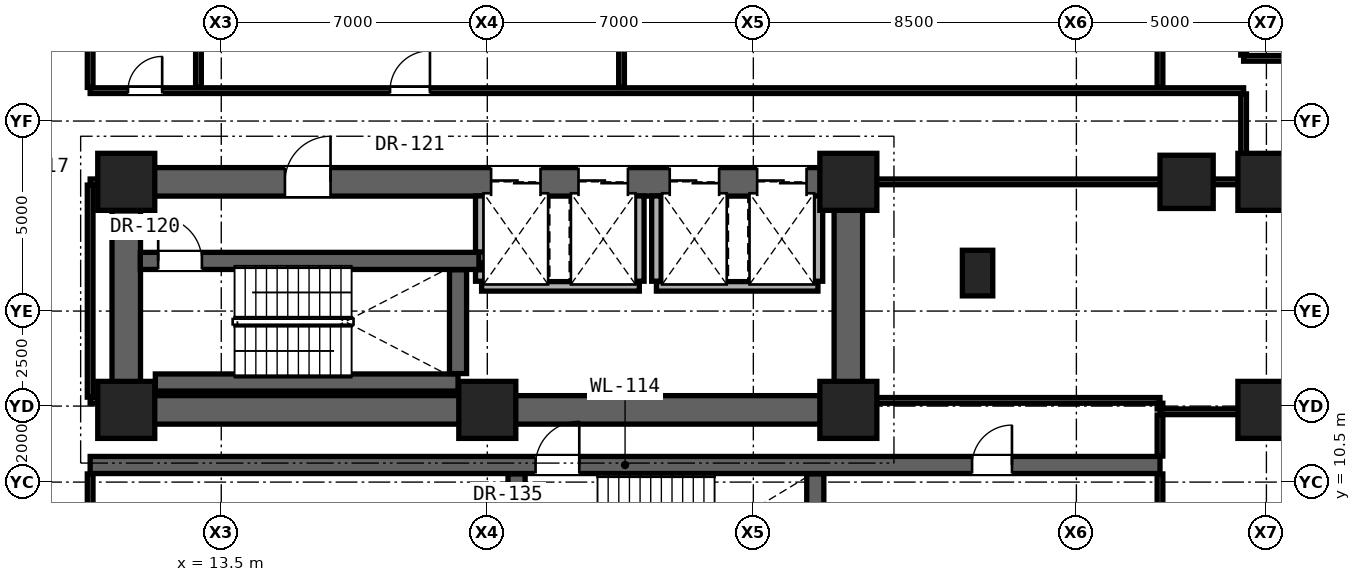
"""IFC4 building model, lengths in metres.
Left out: names, types, materials, properties, quantities, classifications, styles, units other than length and angle.
Written with IfcOpenShell. Run it as: python <this file> out.ifc"""

import sys

from ifc_helpers import new_model, si_unit, direction, frame, frame_2d, origin, origin_2d, place, context, subcontext, project, spatial, rectangle, hollow_rectangle, extrude, element, fill, save


model = new_model("IFC4")
c1 = context("Model", 3, precision=1e-05, world=origin(), true_north=direction((0.0, 1.0)))
c2 = subcontext(c1, "Body", "Model", "MODEL_VIEW")
j1 = project(units=[si_unit("LENGTHUNIT", "METRE"), si_unit("PLANEANGLEUNIT", "RADIAN")], contexts=[c1])
p1 = place(None, origin())
s1 = spatial("IfcSite", under=j1, at=p1, CompositionType="ELEMENT")
p2 = place(p1, origin())
s2 = spatial("IfcBuilding", under=s1, at=p2, CompositionType="ELEMENT")
p3 = place(p2, frame((0.0, 0.0, 13.8)))
s3 = spatial("IfcBuildingStorey", under=s2, at=p3, CompositionType="ELEMENT", Elevation=13.8)
for number, where, z_axis, x_axis in (
    (1, (11.0, 12.4, 0.0), (0.0, 0.0, 1.0), (1.0, 0.0, 0.0)),
    (2, (20.5, 12.4, 0.0), (0.0, 0.0, 1.0), (1.0, 0.0, 0.0)),
    (3, (30.0, 12.4, 0.0), (0.0, 0.0, 1.0), (1.0, 0.0, 0.0)),
    (4, (11.0, 18.4, 0.0), (0.0, 0.0, 1.0), (1.0, 0.0, 0.0)),
    (5, (30.0, 18.4, 0.0), (0.0, 0.0, 1.0), (1.0, 0.0, 0.0)),
):
    element("IfcColumn", number, at=place(p3, frame(where, z_axis=z_axis, x_axis=x_axis)), inside=s3, PredefinedType="COLUMN", context=c2, shape_type="SweptSolid", body=[
        extrude(rectangle(XDim=1.5, YDim=1.5, at=origin_2d()), origin(), (0.0, 0.0, 1.0), 4.3),
    ])
p4 = place(p3, frame((38.9, 18.4, 0.0), z_axis=(0.0, 0.0, 1.0), x_axis=(1.0, 0.0, 0.0)))
e6 = element("IfcColumn", 6, at=p4, inside=s3, PredefinedType="COLUMN", context=c2, shape_type="SweptSolid", body=[
    extrude(hollow_rectangle(XDim=1.4, YDim=1.4, WallThickness=0.08, at=origin_2d()), origin(), (0.0, 0.0, 1.0), 4.3),
])
p5 = place(p3, frame((33.4, 16.0, 0.0), z_axis=(0.0, 0.0, 1.0), x_axis=(1.0, 0.0, 0.0)))
e7 = element("IfcColumn", 7, at=p5, inside=s3, PredefinedType="PILASTER", context=c2, shape_type="SweptSolid", body=[
    extrude(rectangle(XDim=0.8, YDim=1.2, at=origin_2d()), origin(), (0.0, 0.0, 1.0), 4.3),
])
p6 = place(p3, frame((11.0, 12.4, 0.0), z_axis=(0.0, 0.0, 1.0), x_axis=(1.0, 0.0, 0.0)))
e8 = element("IfcWall", 8, at=p6, inside=s3, PredefinedType="SHEAR", context=c2, shape_type="SweptSolid", body=[
    extrude(rectangle(XDim=19.0, YDim=0.75, at=frame_2d((9.5, 0.0))), origin(), (0.0, 0.0, 1.0), 3.65),
])
for number, where, z_axis, x_axis in (
    (9, (11.0, 12.4, 0.0), (0.0, 0.0, 1.0), (0.0, 1.0, 0.0)),
    (10, (30.0, 12.4, 0.0), (0.0, 0.0, 1.0), (0.0, 1.0, 0.0)),
):
    element("IfcWall", number, at=place(p3, frame(where, z_axis=z_axis, x_axis=x_axis)), inside=s3, PredefinedType="SHEAR", context=c2, shape_type="SweptSolid", body=[
        extrude(rectangle(XDim=6.0, YDim=0.75, at=frame_2d((3.0, 0.0))), origin(), (0.0, 0.0, 1.0), 3.65),
    ])
p7 = place(p3, frame((11.0, 18.4, 0.0), z_axis=(0.0, 0.0, 1.0), x_axis=(1.0, 0.0, 0.0)))
e11 = element("IfcWall", 11, at=p7, inside=s3, PredefinedType="SHEAR", context=c2, shape_type="SweptSolid", body=[
    extrude(rectangle(XDim=19.0, YDim=0.75, at=frame_2d((9.5, 0.0))), origin(), (0.0, 0.0, 1.0), 3.65),
])
p8 = place(p7, frame((4.175, 0.0, 0.0)))
e12 = element("IfcOpeningElement", 12, at=p8, cuts=e11, PredefinedType="OPENING", context=c2, shape_type="SweptSolid", body=[
    extrude(rectangle(XDim=1.2, YDim=2.25, at=frame_2d((0.6, 1.125))), frame((0.0, 0.385, 0.0), z_axis=(0.0, -1.0, 0.0), x_axis=(1.0, 0.0, 0.0)), (0.0, 0.0, 1.0), 0.77),
])
p9 = place(p7, frame((9.6, 0.0, 0.0)))
e13 = element("IfcOpeningElement", 13, at=p9, cuts=e11, PredefinedType="OPENING", context=c2, shape_type="SweptSolid", body=[
    extrude(rectangle(XDim=1.3, YDim=2.3, at=frame_2d((0.65, 1.15))), frame((0.0, 0.385, 0.0), z_axis=(0.0, -1.0, 0.0), x_axis=(1.0, 0.0, 0.0)), (0.0, 0.0, 1.0), 0.77),
])
p10 = place(p7, frame((11.9, 0.0, 0.0)))
e14 = element("IfcOpeningElement", 14, at=p10, cuts=e11, PredefinedType="OPENING", context=c2, shape_type="SweptSolid", body=[
    extrude(rectangle(XDim=1.3, YDim=2.3, at=frame_2d((0.65, 1.15))), frame((0.0, 0.385, 0.0), z_axis=(0.0, -1.0, 0.0), x_axis=(1.0, 0.0, 0.0)), (0.0, 0.0, 1.0), 0.77),
])
p11 = place(p7, frame((14.3, 0.0, 0.0)))
e15 = element("IfcOpeningElement", 15, at=p11, cuts=e11, PredefinedType="OPENING", context=c2, shape_type="SweptSolid", body=[
    extrude(rectangle(XDim=1.3, YDim=2.3, at=frame_2d((0.65, 1.15))), frame((0.0, 0.385, 0.0), z_axis=(0.0, -1.0, 0.0), x_axis=(1.0, 0.0, 0.0)), (0.0, 0.0, 1.0), 0.77),
])
p12 = place(p7, frame((16.6, 0.0, 0.0)))
e16 = element("IfcOpeningElement", 16, at=p12, cuts=e11, PredefinedType="OPENING", context=c2, shape_type="SweptSolid", body=[
    extrude(rectangle(XDim=1.3, YDim=2.3, at=frame_2d((0.65, 1.15))), frame((0.0, 0.385, 0.0), z_axis=(0.0, -1.0, 0.0), x_axis=(1.0, 0.0, 0.0)), (0.0, 0.0, 1.0), 0.77),
])
for number, where, z_axis, x_axis in (
    (17, (41.0, 12.4, 0.0), (0.0, 0.0, 1.0), (1.0, 0.0, 0.0)),
    (18, (41.0, 18.4, 0.0), (0.0, 0.0, 1.0), (1.0, 0.0, 0.0)),
):
    element("IfcColumn", number, at=place(p3, frame(where, z_axis=z_axis, x_axis=x_axis)), inside=s3, PredefinedType="COLUMN", context=c2, shape_type="SweptSolid", body=[
        extrude(rectangle(XDim=1.5, YDim=1.5, at=origin_2d()), origin(), (0.0, 0.0, 1.0), 4.3),
    ])
p13 = place(p3, frame((10.05, 10.95, 0.0), z_axis=(0.0, 0.0, 1.0), x_axis=(1.0, 0.0, 0.0)))
e19 = element("IfcWall", 19, at=p13, inside=s3, PredefinedType="SHEAR", context=c2, shape_type="SweptSolid", body=[
    extrude(rectangle(XDim=28.15, YDim=0.45, at=frame_2d((14.075, 0.0))), origin(), (0.0, 0.0, 1.0), 3.65),
])
p14 = place(p13, frame((11.72, 0.0, 0.0)))
e20 = element("IfcOpeningElement", 20, at=p14, cuts=e19, PredefinedType="OPENING", context=c2, shape_type="SweptSolid", body=[
    extrude(rectangle(XDim=1.15, YDim=2.2, at=frame_2d((0.575, 1.1))), frame((0.0, 0.235, 0.0), z_axis=(0.0, -1.0, 0.0), x_axis=(1.0, 0.0, 0.0)), (0.0, 0.0, 1.0), 0.47),
])
p15 = place(p13, frame((23.205, 0.0, 0.0)))
e21 = element("IfcOpeningElement", 21, at=p15, cuts=e19, PredefinedType="OPENING", context=c2, shape_type="SweptSolid", body=[
    extrude(rectangle(XDim=1.05, YDim=2.2, at=frame_2d((0.525, 1.1))), frame((0.0, 0.235, 0.0), z_axis=(0.0, -1.0, 0.0), x_axis=(1.0, 0.0, 0.0)), (0.0, 0.0, 1.0), 0.47),
])
p16 = place(p3, frame((38.2, 12.35, 0.0), z_axis=(0.0, 0.0, 1.0), x_axis=(1.0, 0.0, 0.0)))
e22 = element("IfcWall", 22, at=p16, inside=s3, PredefinedType="PARTITIONING", context=c2, shape_type="SweptSolid", body=[
    extrude(rectangle(XDim=23.6, YDim=0.15, at=frame_2d((11.8, 0.0))), origin(), (0.0, 0.0, 1.0), 2.602),
])
p17 = place(p3, frame((10.05, 12.65, 0.0), z_axis=(0.0, 0.0, 1.0), x_axis=(1.0, 0.0, 0.0)))
e23 = element("IfcWall", 23, at=p17, inside=s3, PredefinedType="PARTITIONING", context=c2, shape_type="SweptSolid", body=[
    extrude(rectangle(XDim=0.58, YDim=0.15, at=frame_2d((0.29, 0.0))), origin(), (0.0, 0.0, 1.0), 3.65),
])
p18 = place(p3, frame((30.37, 12.65, 0.0), z_axis=(0.0, 0.0, 1.0), x_axis=(1.0, 0.0, 0.0)))
e24 = element("IfcWall", 24, at=p18, inside=s3, PredefinedType="PARTITIONING", context=c2, shape_type="SweptSolid", body=[
    extrude(rectangle(XDim=7.83, YDim=0.15, at=frame_2d((3.915, 0.0))), origin(), (0.0, 0.0, 1.0), 2.694),
])
p19 = place(p3, frame((11.765, 13.12, 0.0), z_axis=(0.0, 0.0, 1.0), x_axis=(1.0, 0.0, 0.0)))
e25 = element("IfcWall", 25, at=p19, inside=s3, PredefinedType="SHEAR", context=c2, shape_type="SweptSolid", body=[
    extrude(rectangle(XDim=7.965, YDim=0.45, at=frame_2d((3.982, 0.0))), origin(), (0.0, 0.0, 1.0), 3.65),
])
p20 = place(p3, frame((20.35, 15.65, 0.0), z_axis=(0.0, 0.0, 1.0), x_axis=(1.0, 0.0, 0.0)))
e26 = element("IfcWall", 26, at=p20, inside=s3, PredefinedType="SOLIDWALL", context=c2, shape_type="SweptSolid", body=[
    extrude(rectangle(XDim=4.15, YDim=0.25, at=frame_2d((2.075, 0.0))), origin(), (0.0, 0.0, 1.0), 3.65),
])
p21 = place(p3, frame((24.95, 15.65, 0.0), z_axis=(0.0, 0.0, 1.0), x_axis=(1.0, 0.0, 0.0)))
e27 = element("IfcWall", 27, at=p21, inside=s3, PredefinedType="SOLIDWALL", context=c2, shape_type="SweptSolid", body=[
    extrude(rectangle(XDim=4.25, YDim=0.25, at=frame_2d((2.125, 0.0))), origin(), (0.0, 0.0, 1.0), 3.65),
])
p22 = place(p3, frame((11.37, 16.32, 0.0), z_axis=(0.0, 0.0, 1.0), x_axis=(1.0, 0.0, 0.0)))
e28 = element("IfcWall", 28, at=p22, inside=s3, PredefinedType="SHEAR", context=c2, shape_type="SweptSolid", body=[
    extrude(rectangle(XDim=8.91, YDim=0.45, at=frame_2d((4.455, 0.0))), origin(), (0.0, 0.0, 1.0), 3.65),
])
p23 = place(p22, frame((0.47, 0.0, 0.0)))
e29 = element("IfcOpeningElement", 29, at=p23, cuts=e28, PredefinedType="OPENING", context=c2, shape_type="SweptSolid", body=[
    extrude(rectangle(XDim=1.15, YDim=2.2, at=frame_2d((0.575, 1.1))), frame((0.0, 0.235, 0.0), z_axis=(0.0, -1.0, 0.0), x_axis=(1.0, 0.0, 0.0)), (0.0, 0.0, 1.0), 0.47),
])
p24 = place(p3, frame((10.05, 18.4, 0.0), z_axis=(0.0, 0.0, 1.0), x_axis=(1.0, 0.0, 0.0)))
e30 = element("IfcWall", 30, at=p24, inside=s3, PredefinedType="PARTITIONING", context=c2, shape_type="SweptSolid", body=[
    extrude(rectangle(XDim=0.58, YDim=0.15, at=frame_2d((0.29, 0.0))), origin(), (0.0, 0.0, 1.0), 2.542),
])
p25 = place(p3, frame((30.37, 18.4, 0.0), z_axis=(0.0, 0.0, 1.0), x_axis=(1.0, 0.0, 0.0)))
e31 = element("IfcWall", 31, at=p25, inside=s3, PredefinedType="PARTITIONING", context=c2, shape_type="SweptSolid", body=[
    extrude(rectangle(XDim=10.03, YDim=0.15, at=frame_2d((5.015, 0.0))), origin(), (0.0, 0.0, 1.0), 2.542),
])
p26 = place(p3, frame((10.05, 20.8, 0.0), z_axis=(0.0, 0.0, 1.0), x_axis=(1.0, 0.0, 0.0)))
e32 = element("IfcWall", 32, at=p26, inside=s3, PredefinedType="PARTITIONING", context=c2, shape_type="SweptSolid", body=[
    extrude(rectangle(XDim=30.35, YDim=0.15, at=frame_2d((15.175, 0.0))), origin(), (0.0, 0.0, 1.0), 2.602),
])
p27 = place(p26, frame((0.995, 0.0, 0.0)))
e33 = element("IfcOpeningElement", 33, at=p27, cuts=e32, PredefinedType="OPENING", context=c2, shape_type="SweptSolid", body=[
    extrude(rectangle(XDim=0.9, YDim=2.1, at=frame_2d((0.45, 1.05))), frame((0.0, 0.085, 0.0), z_axis=(0.0, -1.0, 0.0), x_axis=(1.0, 0.0, 0.0)), (0.0, 0.0, 1.0), 0.17),
])
p28 = place(p26, frame((7.891, 0.0, 0.0)))
e34 = element("IfcOpeningElement", 34, at=p28, cuts=e32, PredefinedType="OPENING", context=c2, shape_type="SweptSolid", body=[
    extrude(rectangle(XDim=1.05, YDim=2.2, at=frame_2d((0.525, 1.1))), frame((0.0, 0.085, 0.0), z_axis=(0.0, -1.0, 0.0), x_axis=(1.0, 0.0, 0.0)), (0.0, 0.0, 1.0), 0.17),
])
p29 = place(p3, frame((40.4, 21.65, 0.0), z_axis=(0.0, 0.0, 1.0), x_axis=(1.0, 0.0, 0.0)))
e35 = element("IfcWall", 35, at=p29, inside=s3, PredefinedType="PARTITIONING", context=c2, shape_type="SweptSolid", body=[
    extrude(rectangle(XDim=21.4, YDim=0.15, at=frame_2d((10.7, 0.0))), origin(), (0.0, 0.0, 1.0), 2.602),
])
p30 = place(p3, frame((10.05, 9.285, 0.0), z_axis=(0.0, 0.0, 1.0), x_axis=(0.0, 1.0, 0.0)))
e36 = element("IfcWall", 36, at=p30, inside=s3, PredefinedType="PARTITIONING", context=c2, shape_type="SweptSolid", body=[
    extrude(rectangle(XDim=1.43, YDim=0.15, at=frame_2d((0.715, 0.0))), origin(), (0.0, 0.0, 1.0), 3.65),
])
p31 = place(p3, frame((10.05, 12.735, 0.0), z_axis=(0.0, 0.0, 1.0), x_axis=(0.0, 1.0, 0.0)))
e37 = element("IfcWall", 37, at=p31, inside=s3, PredefinedType="PARTITIONING", context=c2, shape_type="SweptSolid", body=[
    extrude(rectangle(XDim=5.58, YDim=0.15, at=frame_2d((2.79, 0.0))), origin(), (0.0, 0.0, 1.0), 2.542),
])
for number, where, z_axis, x_axis in (
    (38, (10.05, 20.885, 0.0), (0.0, 0.0, 1.0), (0.0, 1.0, 0.0)),
    (39, (12.9, 20.885, 0.0), (0.0, 0.0, 1.0), (0.0, 1.0, 0.0)),
):
    element("IfcWall", number, at=place(p3, frame(where, z_axis=z_axis, x_axis=x_axis)), inside=s3, PredefinedType="PARTITIONING", context=c2, shape_type="SweptSolid", body=[
        extrude(rectangle(XDim=2.63, YDim=0.15, at=frame_2d((1.315, 0.0))), origin(), (0.0, 0.0, 1.0), 3.65),
    ])
p32 = place(p3, frame((19.73, 13.355, 0.0), z_axis=(0.0, 0.0, 1.0), x_axis=(0.0, 1.0, 0.0)))
e40 = element("IfcWall", 40, at=p32, inside=s3, PredefinedType="SHEAR", context=c2, shape_type="SweptSolid", body=[
    extrude(rectangle(XDim=2.73, YDim=0.45, at=frame_2d((1.365, 0.0))), origin(), (0.0, 0.0, 1.0), 3.65),
])
p33 = place(p3, frame((20.315, 15.785, 0.0), z_axis=(0.0, 0.0, 1.0), x_axis=(0.0, 1.0, 0.0)))
e41 = element("IfcWall", 41, at=p33, inside=s3, PredefinedType="SOLIDWALL", context=c2, shape_type="SweptSolid", body=[
    extrude(rectangle(XDim=0.3, YDim=0.25, at=frame_2d((0.15, 0.0))), origin(), (0.0, 0.0, 1.0), 3.65),
])
p34 = place(p3, frame((20.315, 16.555, 0.0), z_axis=(0.0, 0.0, 1.0), x_axis=(0.0, 1.0, 0.0)))
e42 = element("IfcWall", 42, at=p34, inside=s3, PredefinedType="SOLIDWALL", context=c2, shape_type="SweptSolid", body=[
    extrude(rectangle(XDim=1.475, YDim=0.25, at=frame_2d((0.738, 0.0))), origin(), (0.0, 0.0, 1.0), 3.65),
])
p35 = place(p3, frame((21.27, 7.455, 0.0), z_axis=(0.0, 0.0, 1.0), x_axis=(0.0, 1.0, 0.0)))
e43 = element("IfcWall", 43, at=p35, inside=s3, PredefinedType="SHEAR", context=c2, shape_type="SweptSolid", body=[
    extrude(rectangle(XDim=3.26, YDim=0.45, at=frame_2d((1.63, 0.0))), origin(), (0.0, 0.0, 1.0), 3.65),
])
p36 = place(p3, frame((24.032, 20.885, 0.0), z_axis=(0.0, 0.0, 1.0), x_axis=(0.0, 1.0, 0.0)))
e44 = element("IfcWall", 44, at=p36, inside=s3, PredefinedType="PARTITIONING", context=c2, shape_type="SweptSolid", body=[
    extrude(rectangle(XDim=10.63, YDim=0.15, at=frame_2d((5.315, 0.0))), origin(), (0.0, 0.0, 1.0), 2.602),
])
for number, where, z_axis, x_axis in (
    (45, (24.5, 15.785, 0.0), (0.0, 0.0, 1.0), (0.0, 1.0, 0.0)),
    (46, (24.95, 15.785, 0.0), (0.0, 0.0, 1.0), (0.0, 1.0, 0.0)),
):
    element("IfcWall", number, at=place(p3, frame(where, z_axis=z_axis, x_axis=x_axis)), inside=s3, PredefinedType="SOLIDWALL", context=c2, shape_type="SweptSolid", body=[
        extrude(rectangle(XDim=2.245, YDim=0.25, at=frame_2d((1.123, 0.0))), origin(), (0.0, 0.0, 1.0), 3.65),
    ])
p37 = place(p3, frame((29.13, 7.455, 0.0), z_axis=(0.0, 0.0, 1.0), x_axis=(0.0, 1.0, 0.0)))
e47 = element("IfcWall", 47, at=p37, inside=s3, PredefinedType="SHEAR", context=c2, shape_type="SweptSolid", body=[
    extrude(rectangle(XDim=3.26, YDim=0.45, at=frame_2d((1.63, 0.0))), origin(), (0.0, 0.0, 1.0), 3.65),
])
p38 = place(p3, frame((29.2, 15.785, 0.0), z_axis=(0.0, 0.0, 1.0), x_axis=(0.0, 1.0, 0.0)))
e48 = element("IfcWall", 48, at=p38, inside=s3, PredefinedType="SOLIDWALL", context=c2, shape_type="SweptSolid", body=[
    extrude(rectangle(XDim=2.245, YDim=0.25, at=frame_2d((1.123, 0.0))), origin(), (0.0, 0.0, 1.0), 3.65),
])
p39 = place(p3, frame((38.2, 6.935, 0.0), z_axis=(0.0, 0.0, 1.0), x_axis=(0.0, 1.0, 0.0)))
e49 = element("IfcWall", 49, at=p39, inside=s3, PredefinedType="PARTITIONING", context=c2, shape_type="SweptSolid", body=[
    extrude(rectangle(XDim=3.78, YDim=0.15, at=frame_2d((1.89, 0.0))), origin(), (0.0, 0.0, 1.0), 3.65),
])
p40 = place(p39, frame((1.29, 0.0, 0.0)))
e50 = element("IfcOpeningElement", 50, at=p40, cuts=e49, PredefinedType="OPENING", context=c2, shape_type="SweptSolid", body=[
    extrude(rectangle(XDim=1.2, YDim=2.25, at=frame_2d((0.6, 1.125))), frame((0.0, 0.085, 0.0), z_axis=(0.0, -1.0, 0.0), x_axis=(1.0, 0.0, 0.0)), (0.0, 0.0, 1.0), 0.17),
])
p41 = place(p3, frame((38.2, 11.185, 0.0), z_axis=(0.0, 0.0, 1.0), x_axis=(0.0, 1.0, 0.0)))
e51 = element("IfcWall", 51, at=p41, inside=s3, PredefinedType="PARTITIONING", context=c2, shape_type="SweptSolid", body=[
    extrude(rectangle(XDim=1.08, YDim=0.15, at=frame_2d((0.54, 0.0))), origin(), (0.0, 0.0, 1.0), 2.694),
])
p42 = place(p3, frame((38.2, 12.425, 0.0), z_axis=(0.0, 0.0, 1.0), x_axis=(0.0, 1.0, 0.0)))
e52 = element("IfcWall", 52, at=p42, inside=s3, PredefinedType="PARTITIONING", context=c2, shape_type="SweptSolid", body=[
    extrude(rectangle(XDim=0.15, YDim=0.15, at=frame_2d((0.075, 0.0))), origin(), (0.0, 0.0, 1.0), 2.694),
])
p43 = place(p3, frame((38.2, 20.885, 0.0), z_axis=(0.0, 0.0, 1.0), x_axis=(0.0, 1.0, 0.0)))
e53 = element("IfcWall", 53, at=p43, inside=s3, PredefinedType="PARTITIONING", context=c2, shape_type="SweptSolid", body=[
    extrude(rectangle(XDim=10.63, YDim=0.15, at=frame_2d((5.315, 0.0))), origin(), (0.0, 0.0, 1.0), 2.869),
])
p44 = place(p3, frame((40.4, 18.485, 0.0), z_axis=(0.0, 0.0, 1.0), x_axis=(0.0, 1.0, 0.0)))
e54 = element("IfcWall", 54, at=p44, inside=s3, PredefinedType="PARTITIONING", context=c2, shape_type="SweptSolid", body=[
    extrude(rectangle(XDim=2.23, YDim=0.15, at=frame_2d((1.115, 0.0))), origin(), (0.0, 0.0, 1.0), 2.694),
])
p45 = place(p3, frame((40.4, 21.735, 0.0), z_axis=(0.0, 0.0, 1.0), x_axis=(0.0, 1.0, 0.0)))
e55 = element("IfcWall", 55, at=p45, inside=s3, PredefinedType="PARTITIONING", context=c2, shape_type="SweptSolid", body=[
    extrude(rectangle(XDim=9.78, YDim=0.15, at=frame_2d((4.89, 0.0))), origin(), (0.0, 0.0, 1.0), 3.65),
])
p46 = place(p8, origin())
e56 = element("IfcDoor", 56, at=p46, inside=s3, OperationType="SINGLE_SWING_RIGHT", PredefinedType="DOOR", context=c2, shape_type="SweptSolid", body=[
    extrude(rectangle(XDim=1.2, YDim=2.25, at=frame_2d((0.6, 1.125))), frame((0.0, 0.025, 0.0), z_axis=(0.0, -1.0, 0.0), x_axis=(1.0, 0.0, 0.0)), (0.0, 0.0, 1.0), 0.05),
])
fill(e12, e56)
p47 = place(p23, origin())
e57 = element("IfcDoor", 57, at=p47, inside=s3, OperationType="SINGLE_SWING_LEFT", PredefinedType="DOOR", context=c2, shape_type="SweptSolid", body=[
    extrude(rectangle(XDim=1.15, YDim=2.2, at=frame_2d((0.575, 1.1))), frame((0.0, 0.025, 0.0), z_axis=(0.0, -1.0, 0.0), x_axis=(1.0, 0.0, 0.0)), (0.0, 0.0, 1.0), 0.05),
])
fill(e29, e57)
p48 = place(p27, origin())
e58 = element("IfcDoor", 58, at=p48, inside=s3, OperationType="SINGLE_SWING_RIGHT", PredefinedType="DOOR", context=c2, shape_type="SweptSolid", body=[
    extrude(rectangle(XDim=0.9, YDim=2.1, at=frame_2d((0.45, 1.05))), frame((0.0, 0.025, 0.0), z_axis=(0.0, -1.0, 0.0), x_axis=(1.0, 0.0, 0.0)), (0.0, 0.0, 1.0), 0.05),
])
fill(e33, e58)
p49 = place(p14, origin())
e59 = element("IfcDoor", 59, at=p49, inside=s3, OperationType="SINGLE_SWING_RIGHT", PredefinedType="DOOR", context=c2, shape_type="SweptSolid", body=[
    extrude(rectangle(XDim=1.15, YDim=2.2, at=frame_2d((0.575, 1.1))), frame((0.0, 0.025, 0.0), z_axis=(0.0, -1.0, 0.0), x_axis=(1.0, 0.0, 0.0)), (0.0, 0.0, 1.0), 0.05),
])
fill(e20, e59)
p50 = place(p28, origin())
e60 = element("IfcDoor", 60, at=p50, inside=s3, OperationType="SINGLE_SWING_RIGHT", PredefinedType="DOOR", context=c2, shape_type="SweptSolid", body=[
    extrude(rectangle(XDim=1.05, YDim=2.2, at=frame_2d((0.525, 1.1))), frame((0.0, 0.025, 0.0), z_axis=(0.0, -1.0, 0.0), x_axis=(1.0, 0.0, 0.0)), (0.0, 0.0, 1.0), 0.05),
])
fill(e34, e60)
p51 = place(p15, origin())
e61 = element("IfcDoor", 61, at=p51, inside=s3, OperationType="SINGLE_SWING_RIGHT", PredefinedType="DOOR", context=c2, shape_type="SweptSolid", body=[
    extrude(rectangle(XDim=1.05, YDim=2.2, at=frame_2d((0.525, 1.1))), frame((0.0, 0.025, 0.0), z_axis=(0.0, -1.0, 0.0), x_axis=(1.0, 0.0, 0.0)), (0.0, 0.0, 1.0), 0.05),
])
fill(e21, e61)
p52 = place(p9, origin())
e62 = element("IfcDoor", 62, at=p52, inside=s3, OperationType="DOUBLE_DOOR_SLIDING", PredefinedType="DOOR", context=c2, shape_type="SweptSolid", body=[
    extrude(rectangle(XDim=1.3, YDim=2.3, at=frame_2d((0.65, 1.15))), frame((0.0, 0.025, 0.0), z_axis=(0.0, -1.0, 0.0), x_axis=(1.0, 0.0, 0.0)), (0.0, 0.0, 1.0), 0.05),
])
fill(e13, e62)
p53 = place(p10, origin())
e63 = element("IfcDoor", 63, at=p53, inside=s3, OperationType="DOUBLE_DOOR_SLIDING", PredefinedType="DOOR", context=c2, shape_type="SweptSolid", body=[
    extrude(rectangle(XDim=1.3, YDim=2.3, at=frame_2d((0.65, 1.15))), frame((0.0, 0.025, 0.0), z_axis=(0.0, -1.0, 0.0), x_axis=(1.0, 0.0, 0.0)), (0.0, 0.0, 1.0), 0.05),
])
fill(e14, e63)
p54 = place(p11, origin())
e64 = element("IfcDoor", 64, at=p54, inside=s3, OperationType="DOUBLE_DOOR_SLIDING", PredefinedType="DOOR", context=c2, shape_type="SweptSolid", body=[
    extrude(rectangle(XDim=1.3, YDim=2.3, at=frame_2d((0.65, 1.15))), frame((0.0, 0.025, 0.0), z_axis=(0.0, -1.0, 0.0), x_axis=(1.0, 0.0, 0.0)), (0.0, 0.0, 1.0), 0.05),
])
fill(e15, e64)
p55 = place(p12, origin())
e65 = element("IfcDoor", 65, at=p55, inside=s3, OperationType="DOUBLE_DOOR_SLIDING", PredefinedType="DOOR", context=c2, shape_type="SweptSolid", body=[
    extrude(rectangle(XDim=1.3, YDim=2.3, at=frame_2d((0.65, 1.15))), frame((0.0, 0.025, 0.0), z_axis=(0.0, -1.0, 0.0), x_axis=(1.0, 0.0, 0.0)), (0.0, 0.0, 1.0), 0.05),
])
fill(e16, e65)
save(model, sys.argv[1])
